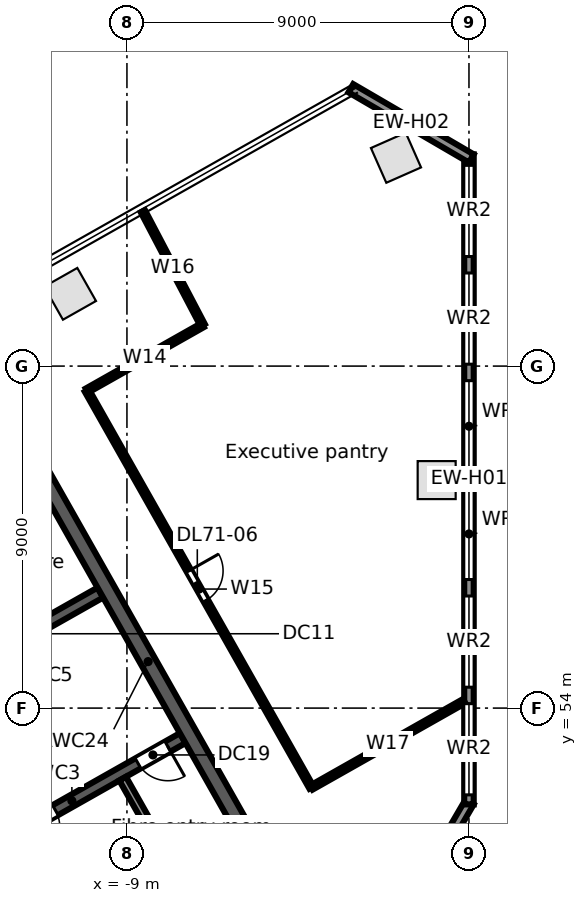
"""IFC4 building model, lengths in metres.
Left out: names, types, materials, properties, quantities, classifications, styles, units other than length and angle.
Written with IfcOpenShell. Run it as: python <this file> out.ifc"""

import sys

from ifc_helpers import new_model, si_unit, direction, frame, frame_2d, origin, origin_2d, place, context, subcontext, project, spatial, rectangle, extrude, element, fill, save


model = new_model("IFC4")
c1 = context("Model", 3, precision=1e-05, world=origin(), true_north=direction((0.0, 1.0)))
c2 = subcontext(c1, "Body", "Model", "MODEL_VIEW")
j1 = project(units=[si_unit("LENGTHUNIT", "METRE"), si_unit("PLANEANGLEUNIT", "RADIAN")], contexts=[c1])
p1 = place(None, origin())
s1 = spatial("IfcSite", under=j1, at=p1, CompositionType="ELEMENT")
p2 = place(p1, origin())
s2 = spatial("IfcBuilding", under=s1, at=p2, CompositionType="ELEMENT")
p3 = place(p2, frame((0.0, 0.0, 324.1)))
s3 = spatial("IfcBuildingStorey", under=s2, at=p3, CompositionType="ELEMENT", Elevation=324.1)
for number, where, z_axis, x_axis in (
    (1, (-10.495, 64.902, 0.0), (0.0, 0.0, 1.0), (-0.87, -0.492, 0.0)),
    (2, (-0.85, 60.0, 0.0), (0.0, 0.0, 1.0), (0.0, 1.0, 0.0)),
    (3, (-1.92, 68.483, 0.0), (0.0, 0.0, 1.0), (-0.915, -0.404, 0.0)),
):
    element("IfcColumn", number, at=place(p3, frame(where, z_axis=z_axis, x_axis=x_axis)), inside=s3, PredefinedType="COLUMN", context=c2, shape_type="SweptSolid", body=[
        extrude(rectangle(XDim=1.0, YDim=1.0, at=origin_2d()), origin(), (0.0, 0.0, 1.0), 3.8),
    ])
p4 = place(p3, frame((0.017, 51.529, 0.0), z_axis=(0.0, 0.0, 1.0), x_axis=(-0.503769237131, -0.863838269424, 0.0)))
e4 = element("IfcWall", 4, at=p4, inside=s3, PredefinedType="STANDARD", context=c2, shape_type="SweptSolid", body=[
    extrude(rectangle(XDim=6.115, YDim=0.25, at=frame_2d((3.057, 0.0))), origin(), (0.0, 0.0, 1.0), 3.52),
])
p5 = place(p3, frame((0.0, 68.572, 0.0), z_axis=(0.0, 0.0, 1.0), x_axis=(0.0, -1.0, 0.0)))
e5 = element("IfcWall", 5, at=p5, inside=s3, PredefinedType="STANDARD", context=c2, shape_type="SweptSolid", body=[
    extrude(rectangle(XDim=17.105, YDim=0.25, at=frame_2d((8.553, 0.0))), origin(), (0.0, 0.0, 1.0), 3.52),
])
p6 = place(p5, frame((14.455, 0.0, 0.8)))
e6 = element("IfcOpeningElement", 6, at=p6, cuts=e5, PredefinedType="OPENING", context=c2, shape_type="SweptSolid", body=[
    extrude(rectangle(XDim=2.4, YDim=2.2, at=frame_2d((1.2, 1.1))), frame((0.0, 0.135, 0.0), z_axis=(0.0, -1.0, 0.0), x_axis=(1.0, 0.0, 0.0)), (0.0, 0.0, 1.0), 0.27),
])
p7 = place(p5, frame((11.622, 0.0, 0.8)))
e7 = element("IfcOpeningElement", 7, at=p7, cuts=e5, PredefinedType="OPENING", context=c2, shape_type="SweptSolid", body=[
    extrude(rectangle(XDim=2.4, YDim=2.2, at=frame_2d((1.2, 1.1))), frame((0.0, 0.135, 0.0), z_axis=(0.0, -1.0, 0.0), x_axis=(1.0, 0.0, 0.0)), (0.0, 0.0, 1.0), 0.27),
])
p8 = place(p5, frame((8.789, 0.0, 0.8)))
e8 = element("IfcOpeningElement", 8, at=p8, cuts=e5, PredefinedType="OPENING", context=c2, shape_type="SweptSolid", body=[
    extrude(rectangle(XDim=2.4, YDim=2.2, at=frame_2d((1.2, 1.1))), frame((0.0, 0.135, 0.0), z_axis=(0.0, -1.0, 0.0), x_axis=(1.0, 0.0, 0.0)), (0.0, 0.0, 1.0), 0.27),
])
p9 = place(p5, frame((5.955, 0.0, 0.8)))
e9 = element("IfcOpeningElement", 9, at=p9, cuts=e5, PredefinedType="OPENING", context=c2, shape_type="SweptSolid", body=[
    extrude(rectangle(XDim=2.4, YDim=2.2, at=frame_2d((1.2, 1.1))), frame((0.0, 0.135, 0.0), z_axis=(0.0, -1.0, 0.0), x_axis=(1.0, 0.0, 0.0)), (0.0, 0.0, 1.0), 0.27),
])
p10 = place(p5, frame((3.122, 0.0, 0.8)))
e10 = element("IfcOpeningElement", 10, at=p10, cuts=e5, PredefinedType="OPENING", context=c2, shape_type="SweptSolid", body=[
    extrude(rectangle(XDim=2.4, YDim=2.2, at=frame_2d((1.2, 1.1))), frame((0.0, 0.135, 0.0), z_axis=(0.0, -1.0, 0.0), x_axis=(1.0, 0.0, 0.0)), (0.0, 0.0, 1.0), 0.27),
])
p11 = place(p5, frame((0.289, 0.0, 0.8)))
e11 = element("IfcOpeningElement", 11, at=p11, cuts=e5, PredefinedType="OPENING", context=c2, shape_type="SweptSolid", body=[
    extrude(rectangle(XDim=2.4, YDim=2.2, at=frame_2d((1.2, 1.1))), frame((0.0, 0.135, 0.0), z_axis=(0.0, -1.0, 0.0), x_axis=(1.0, 0.0, 0.0)), (0.0, 0.0, 1.0), 0.27),
])
p12 = place(p3, frame((-3.108, 70.313, 0.0), z_axis=(0.0, 0.0, 1.0), x_axis=(0.86382474085, -0.503792434536, 0.0)))
e12 = element("IfcWall", 12, at=p12, inside=s3, PredefinedType="STANDARD", context=c2, shape_type="SweptSolid", body=[
    extrude(rectangle(XDim=3.67, YDim=0.25, at=frame_2d((1.835, 0.0))), origin(), (0.0, 0.0, 1.0), 3.52),
])
p13 = place(p3, frame((-13.365, 49.911, 0.0), z_axis=(0.0, 0.0, 1.0), x_axis=(0.870347618718, 0.492437836272, 0.0)))
e13 = element("IfcWall", 13, at=p13, inside=s3, PredefinedType="SOLIDWALL", context=c2, shape_type="SweptSolid", body=[
    extrude(rectangle(XDim=6.7, YDim=0.3, at=frame_2d((3.35, 0.0))), origin(), (0.0, 0.0, 1.0), 3.52),
])
p14 = place(p13, frame((1.95, 0.0, 0.0)))
e14 = element("IfcOpeningElement", 14, at=p14, cuts=e13, PredefinedType="OPENING", context=c2, shape_type="SweptSolid", body=[
    extrude(rectangle(XDim=0.9, YDim=2.1, at=frame_2d((0.45, 1.05))), frame((0.0, 0.16, 0.0), z_axis=(0.0, -1.0, 0.0), x_axis=(1.0, 0.0, 0.0)), (0.0, 0.0, 1.0), 0.32),
])
p15 = place(p13, frame((5.35, 0.0, 0.0)))
e15 = element("IfcOpeningElement", 15, at=p15, cuts=e13, PredefinedType="OPENING", context=c2, shape_type="SweptSolid", body=[
    extrude(rectangle(XDim=0.9, YDim=2.1, at=frame_2d((0.45, 1.05))), frame((0.0, 0.16, 0.0), z_axis=(0.0, -1.0, 0.0), x_axis=(1.0, 0.0, 0.0)), (0.0, 0.0, 1.0), 0.32),
])
p16 = place(p3, frame((-15.618, 53.691, 0.0), z_axis=(0.0, 0.0, 1.0), x_axis=(0.870362830851, 0.492410948978, 0.0)))
e16 = element("IfcWall", 16, at=p16, inside=s3, PredefinedType="SOLIDWALL", context=c2, shape_type="SweptSolid", body=[
    extrude(rectangle(XDim=6.8, YDim=0.3, at=frame_2d((3.4, 0.0))), origin(), (0.0, 0.0, 1.0), 3.52),
])
p17 = place(p16, frame((0.7, 0.0, 0.0)))
e17 = element("IfcOpeningElement", 17, at=p17, cuts=e16, PredefinedType="OPENING", context=c2, shape_type="SweptSolid", body=[
    extrude(rectangle(XDim=0.9, YDim=2.1, at=frame_2d((0.45, 1.05))), frame((0.0, 0.16, 0.0), z_axis=(0.0, -1.0, 0.0), x_axis=(1.0, 0.0, 0.0)), (0.0, 0.0, 1.0), 0.32),
])
p18 = place(p16, frame((4.15, 0.0, 0.0)))
e18 = element("IfcOpeningElement", 18, at=p18, cuts=e16, PredefinedType="OPENING", context=c2, shape_type="SweptSolid", body=[
    extrude(rectangle(XDim=0.9, YDim=2.1, at=frame_2d((0.45, 1.05))), frame((0.0, 0.16, 0.0), z_axis=(0.0, -1.0, 0.0), x_axis=(1.0, 0.0, 0.0)), (0.0, 0.0, 1.0), 0.32),
])
p19 = place(p3, frame((-9.113, 52.144, 0.0), z_axis=(0.0, 0.0, 1.0), x_axis=(0.492422543467, -0.870356271124, 0.0)))
e19 = element("IfcWall", 19, at=p19, inside=s3, PredefinedType="PARTITIONING", context=c2, shape_type="SweptSolid", body=[
    extrude(rectangle(XDim=4.25, YDim=0.2, at=frame_2d((2.125, 0.0))), origin(), (0.0, 0.0, 1.0), 3.52),
])
p20 = place(p3, frame((-11.692, 60.968, 0.0), z_axis=(0.0, 0.0, 1.0), x_axis=(0.492421663121, -0.870356769198, 0.0)))
e20 = element("IfcWall", 20, at=p20, inside=s3, PredefinedType="SOLIDWALL", context=c2, shape_type="SweptSolid", body=[
    extrude(rectangle(XDim=13.2, YDim=0.4, at=frame_2d((6.6, 0.0))), origin(), (0.0, 0.0, 1.0), 3.52),
])
p21 = place(p3, frame((-10.054, 62.355, 0.0), z_axis=(0.0, 0.0, 1.0), x_axis=(0.870470590541, 0.492220429283, 0.0)))
e21 = element("IfcWall", 21, at=p21, inside=s3, PredefinedType="PARTITIONING", context=c2, shape_type="SweptSolid", body=[
    extrude(rectangle(XDim=3.5, YDim=0.125, at=frame_2d((1.75, 0.0))), origin(), (0.0, 0.0, 1.0), 3.52),
])
p22 = place(p3, frame((-10.054, 62.355, 0.0), z_axis=(0.0, 0.0, 1.0), x_axis=(0.49244734164, -0.870342240565, 0.0)))
e22 = element("IfcWall", 22, at=p22, inside=s3, PredefinedType="PARTITIONING", context=c2, shape_type="SweptSolid", body=[
    extrude(rectangle(XDim=12.001, YDim=0.125, at=frame_2d((6.0, 0.0))), origin(), (0.0, 0.0, 1.0), 2.7),
])
p23 = place(p22, frame((5.45, 0.0, 0.0)))
e23 = element("IfcOpeningElement", 23, at=p23, cuts=e22, PredefinedType="OPENING", context=c2, shape_type="SweptSolid", body=[
    extrude(rectangle(XDim=0.9, YDim=2.1, at=frame_2d((0.45, 1.05))), frame((0.0, 0.073, 0.0), z_axis=(0.0, -1.0, 0.0), x_axis=(1.0, 0.0, 0.0)), (0.0, 0.0, 1.0), 0.145),
])
p24 = place(p3, frame((-8.581, 67.076, 0.0), z_axis=(0.0, 0.0, 1.0), x_axis=(0.46483389899, -0.885397902838, 0.0)))
e24 = element("IfcWall", 24, at=p24, inside=s3, PredefinedType="PARTITIONING", context=c2, shape_type="SweptSolid", body=[
    extrude(rectangle(XDim=3.386, YDim=0.125, at=frame_2d((1.693, 0.0))), origin(), (0.0, 0.0, 1.0), 2.888),
])
p25 = place(p3, frame((-4.144, 51.91, 0.0), z_axis=(0.0, 0.0, 1.0), x_axis=(0.870327404496, 0.49247356171, 0.0)))
e25 = element("IfcWall", 25, at=p25, inside=s3, PredefinedType="PARTITIONING", context=c2, shape_type="SweptSolid", body=[
    extrude(rectangle(XDim=4.618, YDim=0.125, at=frame_2d((2.309, 0.0))), origin(), (0.0, 0.0, 1.0), 2.8),
])
p26 = place(p6, origin())
e26 = element("IfcWindow", 26, at=p26, inside=s3, PartitioningType="SINGLE_PANEL", PredefinedType="WINDOW", context=c2, shape_type="SweptSolid", body=[
    extrude(rectangle(XDim=2.4, YDim=2.2, at=frame_2d((1.2, 1.1))), frame((0.0, 0.03, 0.0), z_axis=(0.0, -1.0, 0.0), x_axis=(1.0, 0.0, 0.0)), (0.0, 0.0, 1.0), 0.06),
])
fill(e6, e26)
p27 = place(p7, origin())
e27 = element("IfcWindow", 27, at=p27, inside=s3, PartitioningType="SINGLE_PANEL", PredefinedType="WINDOW", context=c2, shape_type="SweptSolid", body=[
    extrude(rectangle(XDim=2.4, YDim=2.2, at=frame_2d((1.2, 1.1))), frame((0.0, 0.03, 0.0), z_axis=(0.0, -1.0, 0.0), x_axis=(1.0, 0.0, 0.0)), (0.0, 0.0, 1.0), 0.06),
])
fill(e7, e27)
p28 = place(p8, origin())
e28 = element("IfcWindow", 28, at=p28, inside=s3, PartitioningType="SINGLE_PANEL", PredefinedType="WINDOW", context=c2, shape_type="SweptSolid", body=[
    extrude(rectangle(XDim=2.4, YDim=2.2, at=frame_2d((1.2, 1.1))), frame((0.0, 0.03, 0.0), z_axis=(0.0, -1.0, 0.0), x_axis=(1.0, 0.0, 0.0)), (0.0, 0.0, 1.0), 0.06),
])
fill(e8, e28)
p29 = place(p9, origin())
e29 = element("IfcWindow", 29, at=p29, inside=s3, PartitioningType="SINGLE_PANEL", PredefinedType="WINDOW", context=c2, shape_type="SweptSolid", body=[
    extrude(rectangle(XDim=2.4, YDim=2.2, at=frame_2d((1.2, 1.1))), frame((0.0, 0.03, 0.0), z_axis=(0.0, -1.0, 0.0), x_axis=(1.0, 0.0, 0.0)), (0.0, 0.0, 1.0), 0.06),
])
fill(e9, e29)
p30 = place(p10, origin())
e30 = element("IfcWindow", 30, at=p30, inside=s3, PartitioningType="SINGLE_PANEL", PredefinedType="WINDOW", context=c2, shape_type="SweptSolid", body=[
    extrude(rectangle(XDim=2.4, YDim=2.2, at=frame_2d((1.2, 1.1))), frame((0.0, 0.03, 0.0), z_axis=(0.0, -1.0, 0.0), x_axis=(1.0, 0.0, 0.0)), (0.0, 0.0, 1.0), 0.06),
])
fill(e10, e30)
p31 = place(p11, origin())
e31 = element("IfcWindow", 31, at=p31, inside=s3, PartitioningType="SINGLE_PANEL", PredefinedType="WINDOW", context=c2, shape_type="SweptSolid", body=[
    extrude(rectangle(XDim=2.4, YDim=2.2, at=frame_2d((1.2, 1.1))), frame((0.0, 0.03, 0.0), z_axis=(0.0, -1.0, 0.0), x_axis=(1.0, 0.0, 0.0)), (0.0, 0.0, 1.0), 0.06),
])
fill(e11, e31)
p32 = place(p14, frame((0.9, 0.0, 0.0), z_axis=(0.0, 0.0, 1.0), x_axis=(-1.0, 0.0, 0.0)))
e32 = element("IfcDoor", 32, at=p32, inside=s3, OperationType="SINGLE_SWING_RIGHT", PredefinedType="DOOR", context=c2, shape_type="SweptSolid", body=[
    extrude(rectangle(XDim=0.9, YDim=2.1, at=frame_2d((0.45, 1.05))), frame((0.0, 0.025, 0.0), z_axis=(0.0, -1.0, 0.0), x_axis=(1.0, 0.0, 0.0)), (0.0, 0.0, 1.0), 0.05),
])
fill(e14, e32)
p33 = place(p15, frame((0.9, 0.0, 0.0), z_axis=(0.0, 0.0, 1.0), x_axis=(-1.0, 0.0, 0.0)))
e33 = element("IfcDoor", 33, at=p33, inside=s3, OperationType="SINGLE_SWING_LEFT", PredefinedType="DOOR", context=c2, shape_type="SweptSolid", body=[
    extrude(rectangle(XDim=0.9, YDim=2.1, at=frame_2d((0.45, 1.05))), frame((0.0, 0.025, 0.0), z_axis=(0.0, -1.0, 0.0), x_axis=(1.0, 0.0, 0.0)), (0.0, 0.0, 1.0), 0.05),
])
fill(e15, e33)
p34 = place(p23, origin())
e34 = element("IfcDoor", 34, at=p34, inside=s3, OperationType="SINGLE_SWING_LEFT", PredefinedType="DOOR", context=c2, shape_type="SweptSolid", body=[
    extrude(rectangle(XDim=0.9, YDim=2.1, at=frame_2d((0.45, 1.05))), frame((0.0, 0.025, 0.0), z_axis=(0.0, -1.0, 0.0), x_axis=(1.0, 0.0, 0.0)), (0.0, 0.0, 1.0), 0.05),
])
fill(e23, e34)
save(model, sys.argv[1])
